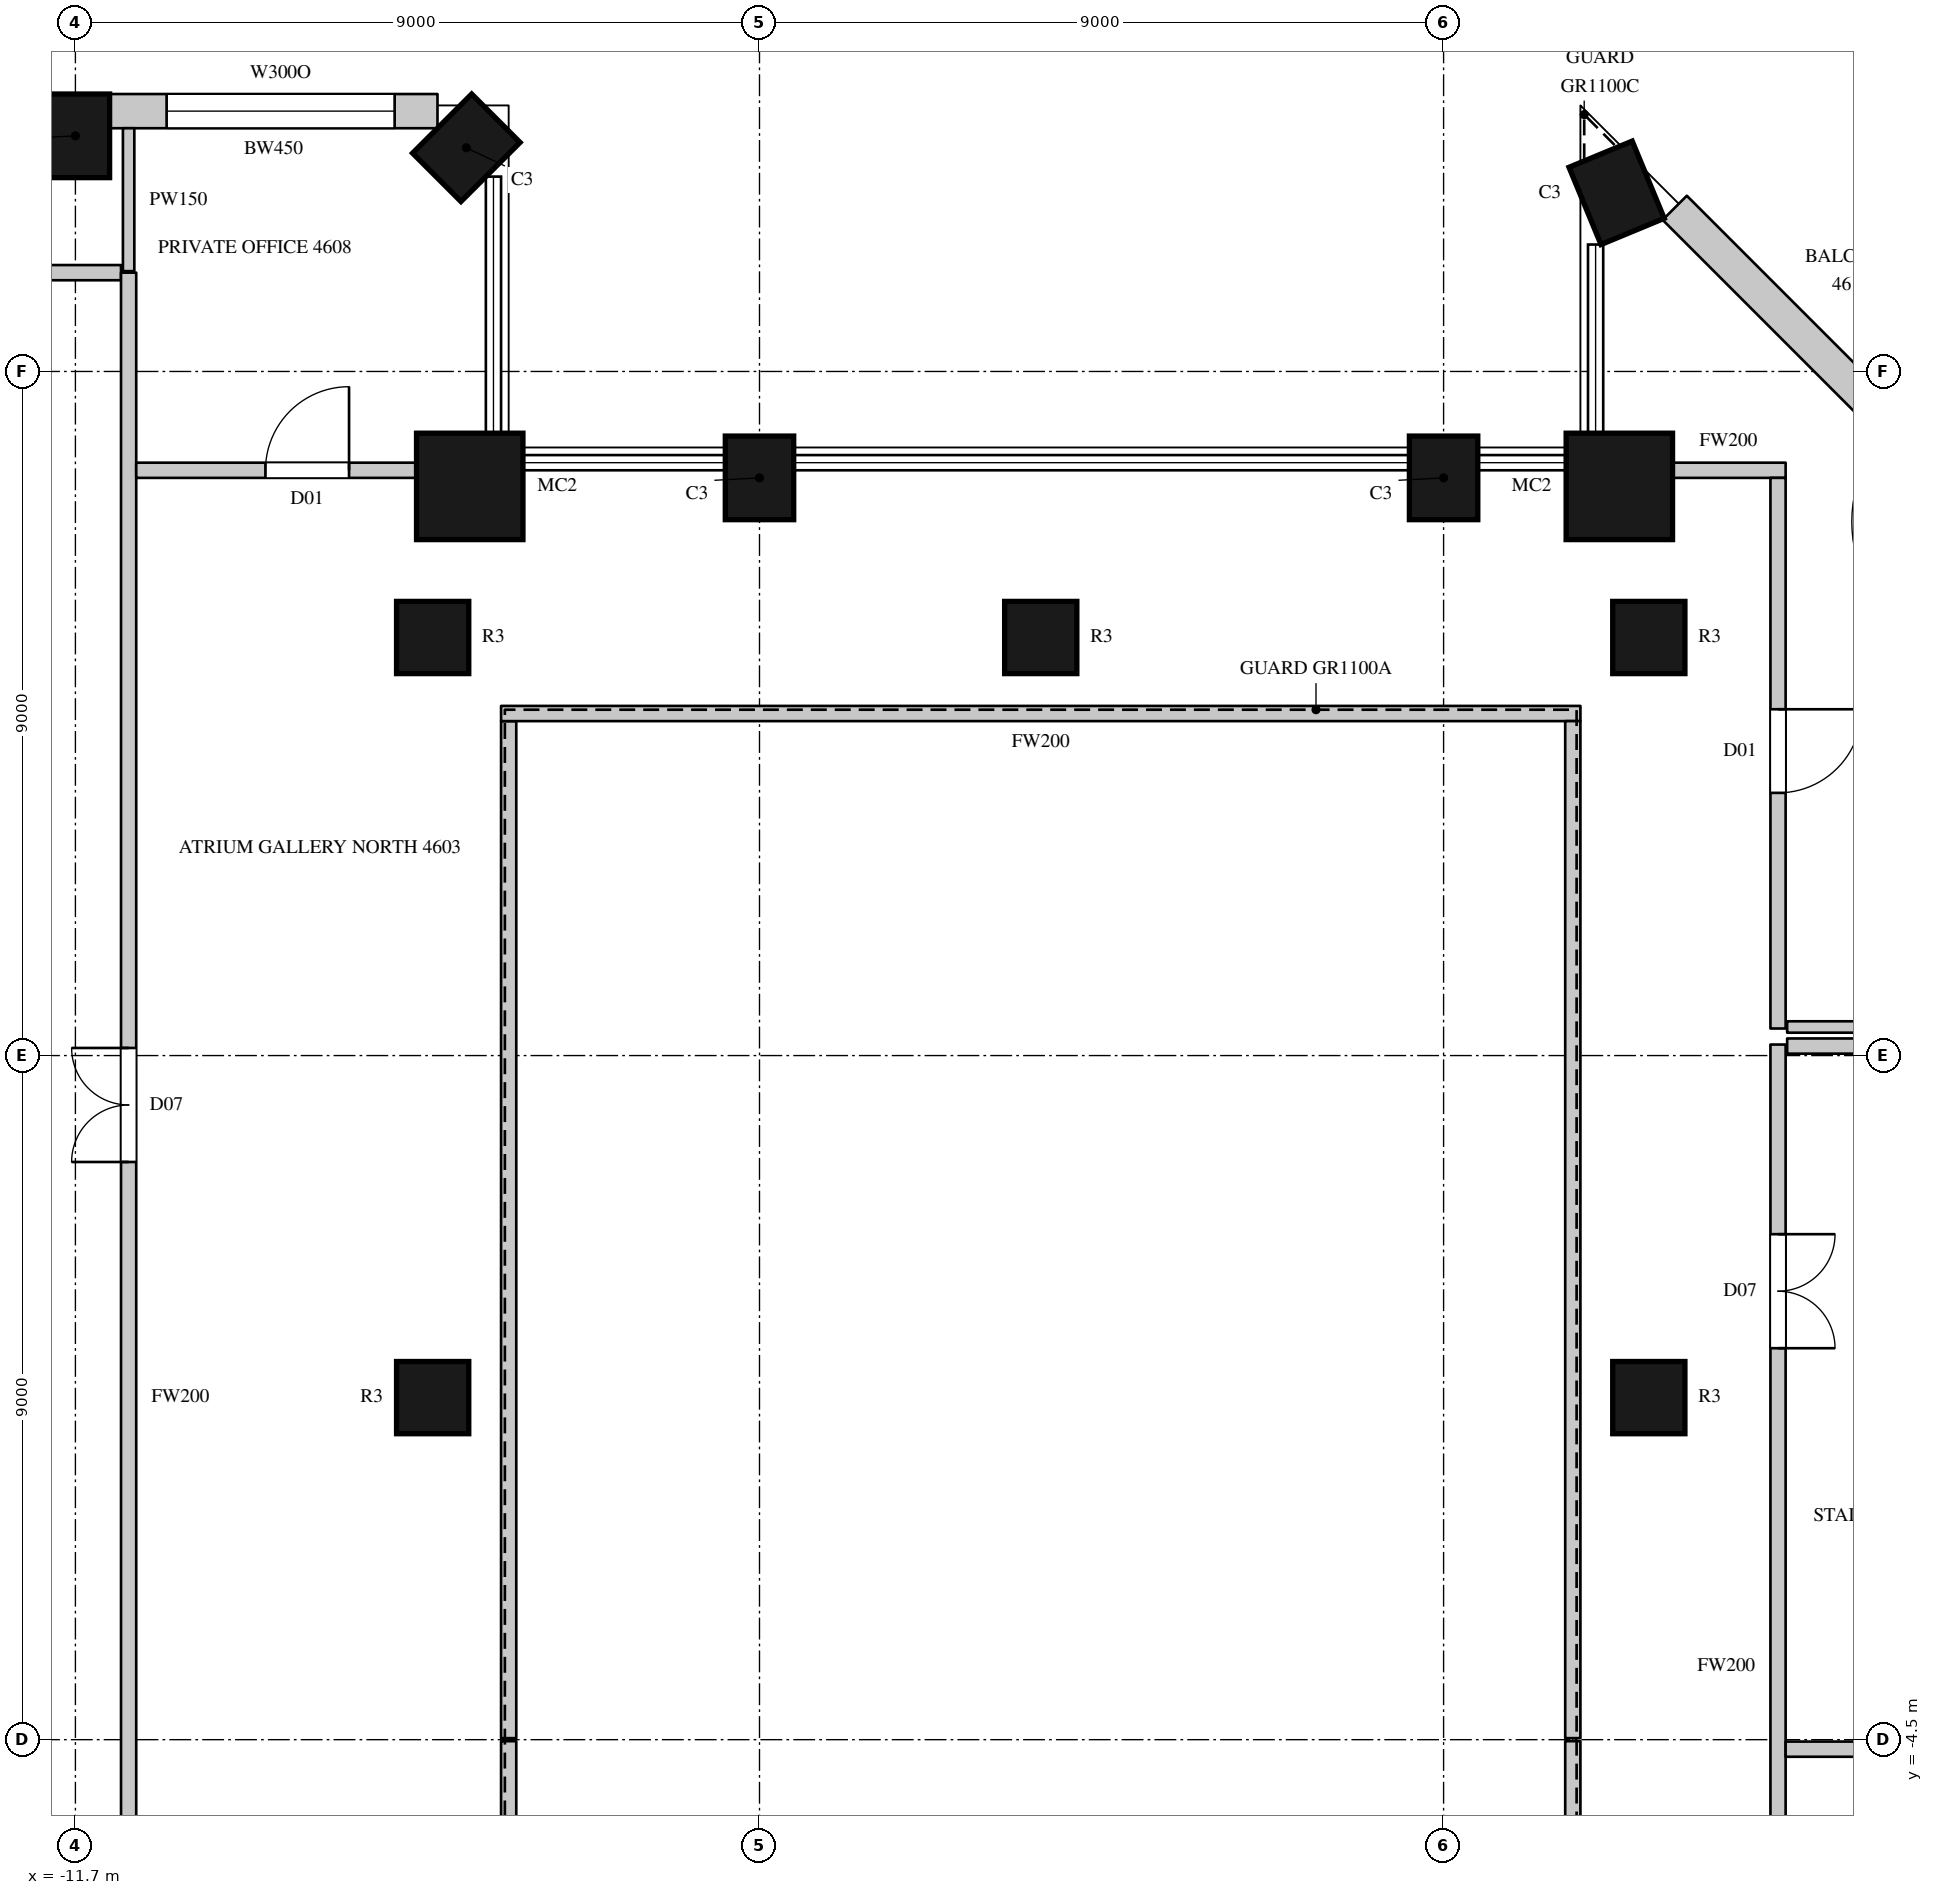
"""IFC4 building model, lengths in metres.
Left out: names, types, materials, properties, quantities, classifications, styles, units other than length and angle.
Written with IfcOpenShell. Run it as: python <this file> out.ifc"""

import sys

from ifc_helpers import new_model, si_unit, direction, frame, frame_2d, origin, origin_2d, place, context, subcontext, project, spatial, rectangle, circle, extrude, element, fill, save


model = new_model("IFC4")
c1 = context("Model", 3, precision=1e-05, world=origin(), true_north=direction((0.0, 1.0)))
c2 = subcontext(c1, "Body", "Model", "MODEL_VIEW")
j1 = project(units=[si_unit("LENGTHUNIT", "METRE"), si_unit("PLANEANGLEUNIT", "RADIAN")], contexts=[c1])
p1 = place(None, origin())
s1 = spatial("IfcSite", under=j1, at=p1, CompositionType="ELEMENT")
p2 = place(p1, origin())
s2 = spatial("IfcBuilding", under=s1, at=p2, CompositionType="ELEMENT")
p3 = place(p2, frame((0.0, 0.0, 209.7)))
s3 = spatial("IfcBuildingStorey", under=s2, at=p3, CompositionType="ELEMENT", Elevation=209.7)
p4 = place(p3, frame((8.576, 15.85, 0.0), z_axis=(0.0, 0.0, 1.0), x_axis=(-0.923879672772, -0.382683093746, 0.0)))
e1 = element("IfcColumn", 1, at=p4, inside=s3, PredefinedType="COLUMN", context=c2, shape_type="SweptSolid", body=[
    extrude(rectangle(XDim=0.9, YDim=1.1, at=origin_2d()), origin(), (0.0, 0.0, 1.0), 4.1),
])
p5 = place(p3, frame((8.612, 11.988, 0.0), z_axis=(0.0, 0.0, 1.0), x_axis=(1.0, 0.0, 0.0)))
e2 = element("IfcColumn", 2, at=p5, inside=s3, PredefinedType="COLUMN", context=c2, shape_type="SweptSolid", body=[
    extrude(circle(Radius=0.7, at=origin_2d()), origin(), (0.0, 0.0, 1.0), 4.1),
])
for number, where, z_axis, x_axis in (
    (3, (6.3, 12.1, 0.0), (0.0, 0.0, 1.0), (-1.0, 0.0, 0.0)),
    (4, (-2.7, 12.1, 0.0), (0.0, 0.0, 1.0), (-1.0, 0.0, 0.0)),
):
    element("IfcColumn", number, at=place(p3, frame(where, z_axis=z_axis, x_axis=x_axis)), inside=s3, PredefinedType="COLUMN", context=c2, shape_type="SweptSolid", body=[
        extrude(rectangle(XDim=0.9, YDim=1.1, at=origin_2d()), origin(), (0.0, 0.0, 1.0), 4.1),
    ])
p6 = place(p3, frame((-6.512, 11.988, 0.0), z_axis=(0.0, 0.0, 1.0), x_axis=(1.0, 0.0, 0.0)))
e5 = element("IfcColumn", 5, at=p6, inside=s3, PredefinedType="COLUMN", context=c2, shape_type="SweptSolid", body=[
    extrude(circle(Radius=0.7, at=origin_2d()), origin(), (0.0, 0.0, 1.0), 4.1),
])
for number, where, z_axis, x_axis in (
    (6, (-6.557, 16.443, 0.0), (0.0, 0.0, 1.0), (-0.707, 0.707, 0.0)),
    (7, (-11.7, 16.6, 0.0), (0.0, 0.0, 1.0), (-1.0, 0.0, 0.0)),
):
    element("IfcColumn", number, at=place(p3, frame(where, z_axis=z_axis, x_axis=x_axis)), inside=s3, PredefinedType="COLUMN", context=c2, shape_type="SweptSolid", body=[
        extrude(rectangle(XDim=0.9, YDim=1.1, at=origin_2d()), origin(), (0.0, 0.0, 1.0), 4.1),
    ])
for number, where, z_axis, x_axis in (
    (8, (-7.0, 0.0, 0.0), (0.0, 0.0, 1.0), (1.0, 0.0, 0.0)),
    (9, (-7.0, 10.0, 0.0), (0.0, 0.0, 1.0), (1.0, 0.0, 0.0)),
    (10, (1.0, 10.0, 0.0), (0.0, 0.0, 1.0), (1.0, 0.0, 0.0)),
    (11, (9.0, 0.0, 0.0), (0.0, 0.0, 1.0), (1.0, 0.0, 0.0)),
    (12, (9.0, 10.0, 0.0), (0.0, 0.0, 1.0), (1.0, 0.0, 0.0)),
):
    element("IfcColumn", number, at=place(p3, frame(where, z_axis=z_axis, x_axis=x_axis)), inside=s3, PredefinedType="COLUMN", context=c2, shape_type="SweptSolid", body=[
        extrude(circle(Radius=0.475, at=origin_2d()), origin(), (0.0, 0.0, 1.0), 4.1),
    ])
p7 = place(p3, frame((13.941, 11.053, 0.0), z_axis=(0.0, 0.0, 1.0), x_axis=(-0.707106781187, 0.707106781187, 0.0)))
e13 = element("IfcWall", 13, at=p7, inside=s3, PredefinedType="SOLIDWALL", context=c2, shape_type="SweptSolid", body=[
    extrude(rectangle(XDim=6.505, YDim=0.45, at=frame_2d((3.252, 0.0))), origin(), (0.0, 0.0, 1.0), 3.8),
])
p8 = place(p7, frame((0.665, 0.0, 0.0)))
e14 = element("IfcOpeningElement", 14, at=p8, cuts=e13, PredefinedType="OPENING", context=c2, shape_type="SweptSolid", body=[
    extrude(rectangle(XDim=1.8, YDim=2.4, at=frame_2d((0.9, 1.2))), frame((0.0, 0.235, 0.0), z_axis=(0.0, -1.0, 0.0), x_axis=(1.0, 0.0, 0.0)), (0.0, 0.0, 1.0), 0.47),
])
p9 = place(p3, frame((-6.936, 16.925, 0.0), z_axis=(0.0, 0.0, 1.0), x_axis=(-1.0, 0.0, 0.0)))
e15 = element("IfcWall", 15, at=p9, inside=s3, PredefinedType="SOLIDWALL", context=c2, shape_type="SweptSolid", body=[
    extrude(rectangle(XDim=4.314, YDim=0.45, at=frame_2d((2.157, 0.0))), origin(), (0.0, 0.0, 1.0), 3.8),
])
p10 = place(p9, frame((0.564, 0.0, 1.05)))
e16 = element("IfcOpeningElement", 16, at=p10, cuts=e15, PredefinedType="OPENING", context=c2, shape_type="SweptSolid", body=[
    extrude(rectangle(XDim=3.0, YDim=2.4, at=frame_2d((1.5, 1.2))), frame((0.0, 0.235, 0.0), z_axis=(0.0, -1.0, 0.0), x_axis=(1.0, 0.0, 0.0)), (0.0, 0.0, 1.0), 0.47),
])
p11 = place(p3, frame((-13.97, 14.8, 0.0), z_axis=(0.0, 0.0, 1.0), x_axis=(1.0, 0.0, 0.0)))
e17 = element("IfcWall", 17, at=p11, inside=s3, PredefinedType="PARTITIONING", context=c2, shape_type="SweptSolid", body=[
    extrude(rectangle(XDim=2.87, YDim=0.2, at=frame_2d((1.435, 0.0))), origin(), (0.0, 0.0, 1.0), 3.8),
])
p12 = place(p3, frame((-11.0, -14.8, 0.0), z_axis=(0.0, 0.0, 1.0), x_axis=(0.0, 1.0, 0.0)))
e18 = element("IfcWall", 18, at=p12, inside=s3, PredefinedType="PARTITIONING", context=c2, shape_type="SweptSolid", body=[
    extrude(rectangle(XDim=29.6, YDim=0.2, at=frame_2d((14.8, 0.0))), origin(), (0.0, 0.0, 1.0), 3.8),
])
p13 = place(p12, frame((17.9, 0.0, 0.0)))
e19 = element("IfcOpeningElement", 19, at=p13, cuts=e18, PredefinedType="OPENING", context=c2, shape_type="SweptSolid", body=[
    extrude(rectangle(XDim=1.5, YDim=2.4, at=frame_2d((0.75, 1.2))), frame((0.0, 0.11, 0.0), z_axis=(0.0, -1.0, 0.0), x_axis=(1.0, 0.0, 0.0)), (0.0, 0.0, 1.0), 0.22),
])
p14 = place(p3, frame((-10.9, 12.2, 0.0), z_axis=(0.0, 0.0, 1.0), x_axis=(1.0, 0.0, 0.0)))
e20 = element("IfcWall", 20, at=p14, inside=s3, PredefinedType="PARTITIONING", context=c2, shape_type="SweptSolid", body=[
    extrude(rectangle(XDim=3.704, YDim=0.2, at=frame_2d((1.852, 0.0))), origin(), (0.0, 0.0, 1.0), 3.8),
])
p15 = place(p14, frame((1.7, 0.0, 0.0)))
e21 = element("IfcOpeningElement", 21, at=p15, cuts=e20, PredefinedType="OPENING", context=c2, shape_type="SweptSolid", body=[
    extrude(rectangle(XDim=1.1, YDim=2.4, at=frame_2d((0.55, 1.2))), frame((0.0, 0.11, 0.0), z_axis=(0.0, -1.0, 0.0), x_axis=(1.0, 0.0, 0.0)), (0.0, 0.0, 1.0), 0.22),
])
p16 = place(p3, frame((-6.0, -8.9, 0.0), z_axis=(0.0, 0.0, 1.0), x_axis=(0.0, 1.0, 0.0)))
e22 = element("IfcWall", 22, at=p16, inside=s3, PredefinedType="PARTITIONING", context=c2, shape_type="SweptSolid", body=[
    extrude(rectangle(XDim=4.38, YDim=0.2, at=frame_2d((2.19, 0.0))), origin(), (0.0, 0.0, 1.0), 3.8),
])
p17 = place(p3, frame((-6.0, -4.48, 0.0), z_axis=(0.0, 0.0, 1.0), x_axis=(0.0, 1.0, 0.0)))
e23 = element("IfcWall", 23, at=p17, inside=s3, PredefinedType="PARTITIONING", context=c2, shape_type="SweptSolid", body=[
    extrude(rectangle(XDim=13.38, YDim=0.2, at=frame_2d((6.69, 0.0))), origin(), (0.0, 0.0, 1.0), 3.8),
])
p18 = place(p3, frame((-6.1, 9.0, 0.0), z_axis=(0.0, 0.0, 1.0), x_axis=(1.0, 0.0, 0.0)))
e24 = element("IfcWall", 24, at=p18, inside=s3, PredefinedType="PARTITIONING", context=c2, shape_type="SweptSolid", body=[
    extrude(rectangle(XDim=14.2, YDim=0.2, at=frame_2d((7.1, 0.0))), origin(), (0.0, 0.0, 1.0), 3.8),
])
p19 = place(p3, frame((8.0, -8.9, 0.0), z_axis=(0.0, 0.0, 1.0), x_axis=(0.0, 1.0, 0.0)))
e25 = element("IfcWall", 25, at=p19, inside=s3, PredefinedType="PARTITIONING", context=c2, shape_type="SweptSolid", body=[
    extrude(rectangle(XDim=4.38, YDim=0.2, at=frame_2d((2.19, 0.0))), origin(), (0.0, 0.0, 1.0), 3.8),
])
p20 = place(p3, frame((8.0, -4.48, 0.0), z_axis=(0.0, 0.0, 1.0), x_axis=(0.0, 1.0, 0.0)))
e26 = element("IfcWall", 26, at=p20, inside=s3, PredefinedType="PARTITIONING", context=c2, shape_type="SweptSolid", body=[
    extrude(rectangle(XDim=13.38, YDim=0.2, at=frame_2d((6.69, 0.0))), origin(), (0.0, 0.0, 1.0), 3.8),
])
p21 = place(p3, frame((9.296, 12.2, 0.0), z_axis=(0.0, 0.0, 1.0), x_axis=(1.0, 0.0, 0.0)))
e27 = element("IfcWall", 27, at=p21, inside=s3, PredefinedType="PARTITIONING", context=c2, shape_type="SweptSolid", body=[
    extrude(rectangle(XDim=1.504, YDim=0.2, at=frame_2d((0.752, 0.0))), origin(), (0.0, 0.0, 1.0), 3.8),
])
p22 = place(p3, frame((10.7, -11.7, 0.0), z_axis=(0.0, 0.0, 1.0), x_axis=(0.0, 1.0, 0.0)))
e28 = element("IfcWall", 28, at=p22, inside=s3, PredefinedType="PARTITIONING", context=c2, shape_type="SweptSolid", body=[
    extrude(rectangle(XDim=16.345, YDim=0.2, at=frame_2d((8.172, 0.0))), origin(), (0.0, 0.0, 1.0), 3.8),
])
p23 = place(p22, frame((12.35, 0.0, 0.0)))
e29 = element("IfcOpeningElement", 29, at=p23, cuts=e28, PredefinedType="OPENING", context=c2, shape_type="SweptSolid", body=[
    extrude(rectangle(XDim=1.5, YDim=2.4, at=frame_2d((0.75, 1.2))), frame((0.0, 0.11, 0.0), z_axis=(0.0, -1.0, 0.0), x_axis=(1.0, 0.0, 0.0)), (0.0, 0.0, 1.0), 0.22),
])
p24 = place(p22, frame((3.0, 0.0, 0.0)))
e30 = element("IfcOpeningElement", 30, at=p24, cuts=e28, PredefinedType="OPENING", context=c2, shape_type="SweptSolid", body=[
    extrude(rectangle(XDim=1.1, YDim=2.4, at=frame_2d((0.55, 1.2))), frame((0.0, 0.11, 0.0), z_axis=(0.0, -1.0, 0.0), x_axis=(1.0, 0.0, 0.0)), (0.0, 0.0, 1.0), 0.22),
])
p25 = place(p3, frame((10.8, -4.625, 0.0), z_axis=(0.0, 0.0, 1.0), x_axis=(1.0, 0.0, 0.0)))
e31 = element("IfcWall", 31, at=p25, inside=s3, PredefinedType="PARTITIONING", context=c2, shape_type="SweptSolid", body=[
    extrude(rectangle(XDim=3.875, YDim=0.2, at=frame_2d((1.938, 0.0))), origin(), (0.0, 0.0, 1.0), 3.8),
])
p26 = place(p3, frame((10.7, 4.856, 0.0), z_axis=(0.0, 0.0, 1.0), x_axis=(0.0, 1.0, 0.0)))
e32 = element("IfcWall", 32, at=p26, inside=s3, PredefinedType="PARTITIONING", context=c2, shape_type="SweptSolid", body=[
    extrude(rectangle(XDim=7.244, YDim=0.2, at=frame_2d((3.622, 0.0))), origin(), (0.0, 0.0, 1.0), 3.8),
])
p27 = place(p26, frame((3.1, 0.0, 0.0)))
e33 = element("IfcOpeningElement", 33, at=p27, cuts=e32, PredefinedType="OPENING", context=c2, shape_type="SweptSolid", body=[
    extrude(rectangle(XDim=1.1, YDim=2.4, at=frame_2d((0.55, 1.2))), frame((0.0, 0.11, 0.0), z_axis=(0.0, -1.0, 0.0), x_axis=(1.0, 0.0, 0.0)), (0.0, 0.0, 1.0), 0.22),
])
p28 = place(p3, frame((10.82, 4.625, 0.0), z_axis=(0.0, 0.0, 1.0), x_axis=(1.0, 0.0, 0.0)))
e34 = element("IfcWall", 34, at=p28, inside=s3, PredefinedType="PARTITIONING", context=c2, shape_type="SweptSolid", body=[
    extrude(rectangle(XDim=3.835, YDim=0.2, at=frame_2d((1.917, 0.0))), origin(), (0.0, 0.0, 1.0), 3.8),
])
p29 = place(p3, frame((-11.0, 14.82, 0.0), z_axis=(0.0, 0.0, 1.0), x_axis=(0.0, 1.0, 0.0)))
e35 = element("IfcWall", 35, at=p29, inside=s3, PredefinedType="PARTITIONING", context=c2, shape_type="SweptSolid", body=[
    extrude(rectangle(XDim=1.88, YDim=0.15, at=frame_2d((0.94, 0.0))), origin(), (0.0, 0.0, 1.0), 3.8),
])
p30 = place(p3, frame((10.82, 4.876, 0.0), z_axis=(0.0, 0.0, 1.0), x_axis=(1.0, 0.0, 0.0)))
e36 = element("IfcWall", 36, at=p30, inside=s3, PredefinedType="PARTITIONING", context=c2, shape_type="SweptSolid", body=[
    extrude(rectangle(XDim=8.095, YDim=0.15, at=frame_2d((4.047, 0.0))), origin(), (0.0, 0.0, 1.0), 3.8),
])
p31 = place(p10, origin())
e37 = element("IfcWindow", 37, at=p31, inside=s3, PartitioningType="SINGLE_PANEL", PredefinedType="WINDOW", context=c2, shape_type="SweptSolid", body=[
    extrude(rectangle(XDim=3.0, YDim=2.4, at=frame_2d((1.5, 1.2))), frame((0.0, 0.135, 0.0), z_axis=(0.0, -1.0, 0.0), x_axis=(1.0, 0.0, 0.0)), (0.0, 0.0, 1.0), 0.06),
])
fill(e16, e37)
p32 = place(p13, origin())
e38 = element("IfcDoor", 38, at=p32, inside=s3, OperationType="DOUBLE_DOOR_SINGLE_SWING", PredefinedType="DOOR", context=c2, shape_type="SweptSolid", body=[
    extrude(rectangle(XDim=1.5, YDim=2.4, at=frame_2d((0.75, 1.2))), frame((0.0, 0.025, 0.0), z_axis=(0.0, -1.0, 0.0), x_axis=(1.0, 0.0, 0.0)), (0.0, 0.0, 1.0), 0.05),
])
fill(e19, e38)
p33 = place(p23, origin())
e39 = element("IfcDoor", 39, at=p33, inside=s3, OperationType="DOUBLE_DOOR_SINGLE_SWING", PredefinedType="DOOR", context=c2, shape_type="SweptSolid", body=[
    extrude(rectangle(XDim=1.5, YDim=2.4, at=frame_2d((0.75, 1.2))), frame((0.0, 0.025, 0.0), z_axis=(0.0, -1.0, 0.0), x_axis=(1.0, 0.0, 0.0)), (0.0, 0.0, 1.0), 0.05),
])
fill(e29, e39)
p34 = place(p15, origin())
e40 = element("IfcDoor", 40, at=p34, inside=s3, OperationType="SINGLE_SWING_RIGHT", PredefinedType="DOOR", context=c2, shape_type="SweptSolid", body=[
    extrude(rectangle(XDim=1.1, YDim=2.4, at=frame_2d((0.55, 1.2))), frame((0.0, 0.025, 0.0), z_axis=(0.0, -1.0, 0.0), x_axis=(1.0, 0.0, 0.0)), (0.0, 0.0, 1.0), 0.05),
])
fill(e21, e40)
p35 = place(p27, origin())
e41 = element("IfcDoor", 41, at=p35, inside=s3, OperationType="SINGLE_SWING_LEFT", PredefinedType="DOOR", context=c2, shape_type="SweptSolid", body=[
    extrude(rectangle(XDim=1.1, YDim=2.4, at=frame_2d((0.55, 1.2))), frame((0.0, 0.025, 0.0), z_axis=(0.0, -1.0, 0.0), x_axis=(1.0, 0.0, 0.0)), (0.0, 0.0, 1.0), 0.05),
])
fill(e33, e41)
save(model, sys.argv[1])
